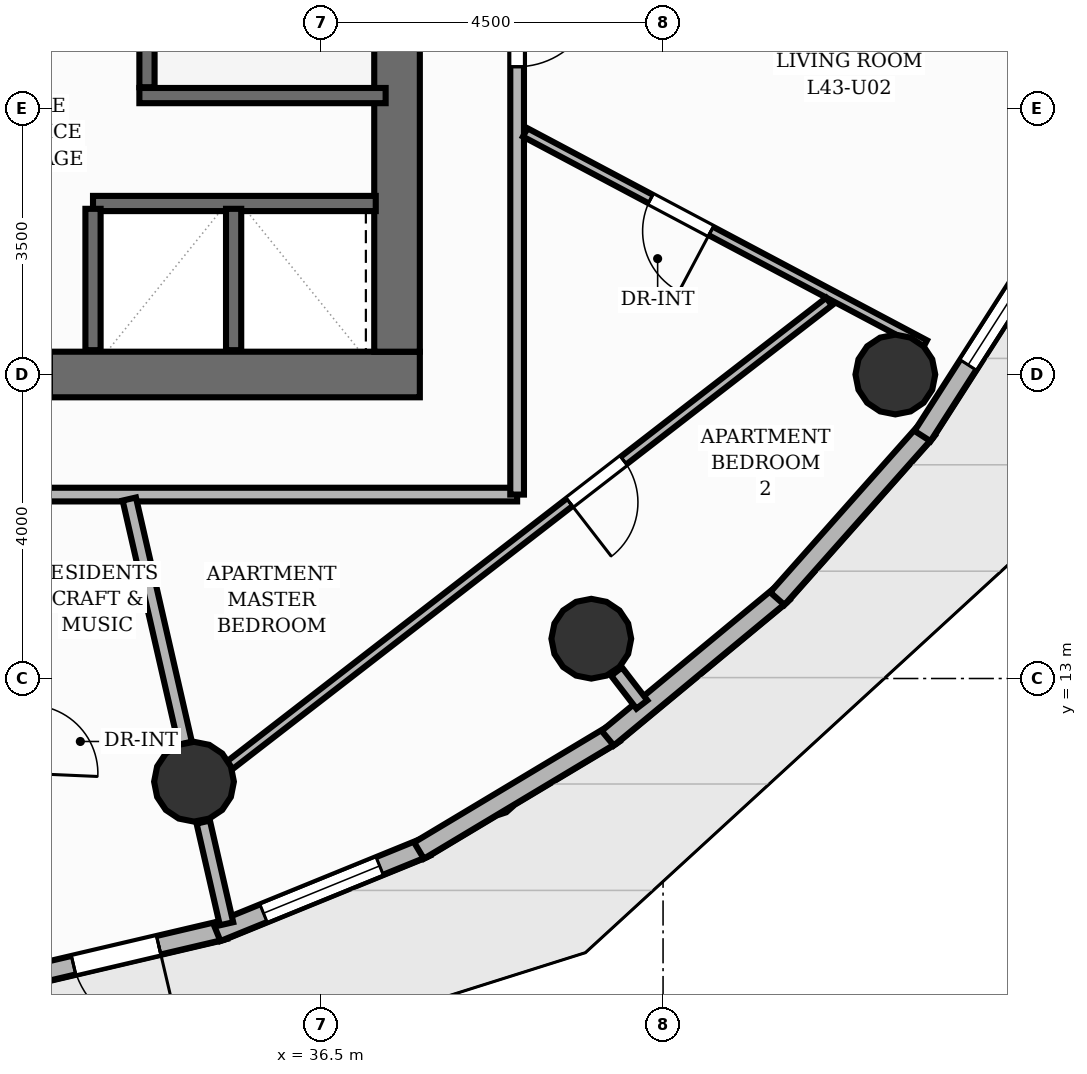
"""IFC4 building model, lengths in metres.
Left out: names, types, materials, properties, quantities, classifications, styles, units other than length and angle.
Written with IfcOpenShell. Run it as: python <this file> out.ifc"""

import sys

from ifc_helpers import new_model, si_unit, direction, frame, frame_2d, origin, origin_2d, place, context, subcontext, project, spatial, rectangle, circle, extrude, element, fill, save


model = new_model("IFC4")
c1 = context("Model", 3, precision=1e-05, world=origin(), true_north=direction((0.0, 1.0)))
c2 = subcontext(c1, "Body", "Model", "MODEL_VIEW")
j1 = project(units=[si_unit("LENGTHUNIT", "METRE"), si_unit("PLANEANGLEUNIT", "RADIAN")], contexts=[c1])
p1 = place(None, origin())
s1 = spatial("IfcSite", under=j1, at=p1, CompositionType="ELEMENT")
p2 = place(p1, origin())
s2 = spatial("IfcBuilding", under=s1, at=p2, CompositionType="ELEMENT")
p3 = place(p2, frame((0.0, 0.0, 145.76)))
s3 = spatial("IfcBuildingStorey", under=s2, at=p3, CompositionType="ELEMENT", Elevation=145.76)
p4 = place(p3, frame((22.7, 17.0, 0.0), z_axis=(0.0, 0.0, 1.0), x_axis=(1.0, 0.0, 0.0)))
e1 = element("IfcWall", 1, at=p4, inside=s3, PredefinedType="SHEAR", context=c2, shape_type="SweptSolid", body=[
    extrude(rectangle(XDim=15.1, YDim=0.6, at=frame_2d((7.55, 0.0))), origin(), (0.0, 0.0, 1.0), 3.2),
])
p5 = place(p4, frame((5.8, 0.0, 0.0)))
e2 = element("IfcOpeningElement", 2, at=p5, cuts=e1, PredefinedType="OPENING", context=c2, shape_type="SweptSolid", body=[
    extrude(rectangle(XDim=1.1, YDim=2.15, at=frame_2d((0.55, 1.075))), frame((0.0, 0.31, 0.0), z_axis=(0.0, -1.0, 0.0), x_axis=(1.0, 0.0, 0.0)), (0.0, 0.0, 1.0), 0.62),
])
p6 = place(p4, frame((9.35, 0.0, 0.0)))
e3 = element("IfcOpeningElement", 3, at=p6, cuts=e1, PredefinedType="OPENING", context=c2, shape_type="SweptSolid", body=[
    extrude(rectangle(XDim=0.9, YDim=2.1, at=frame_2d((0.45, 1.05))), frame((0.0, 0.31, 0.0), z_axis=(0.0, -1.0, 0.0), x_axis=(1.0, 0.0, 0.0)), (0.0, 0.0, 1.0), 0.62),
])
p7 = place(p3, frame((37.5, 17.3, 0.0), z_axis=(0.0, 0.0, 1.0), x_axis=(0.0, 1.0, 0.0)))
e4 = element("IfcWall", 4, at=p7, inside=s3, PredefinedType="SHEAR", context=c2, shape_type="SweptSolid", body=[
    extrude(rectangle(XDim=13.4, YDim=0.6, at=frame_2d((6.7, 0.0))), origin(), (0.0, 0.0, 1.0), 3.2),
])
for number, where, z_axis, x_axis in (
    (5, (34.829, 11.642, 0.0), (0.0, 0.0, 1.0), (1.0, 0.0, 0.0)),
    (6, (40.056, 13.523, 0.0), (0.0, 0.0, 1.0), (1.0, 0.0, 0.0)),
    (7, (44.056, 17.0, 0.0), (0.0, 0.0, 1.0), (1.0, 0.0, 0.0)),
):
    element("IfcColumn", number, at=place(p3, frame(where, z_axis=z_axis, x_axis=x_axis)), inside=s3, PredefinedType="COLUMN", context=c2, shape_type="SweptSolid", body=[
        extrude(circle(Radius=0.525, at=origin_2d()), origin(), (0.0, 0.0, 1.0), 3.2),
    ])
p8 = place(p3, frame((35.233, 9.695, 0.0), z_axis=(0.0, 0.0, 1.0), x_axis=(-0.973538048261, -0.228524984602, 0.0)))
e8 = element("IfcWall", 8, at=p8, inside=s3, PredefinedType="SOLIDWALL", context=c2, shape_type="SweptSolid", body=[
    extrude(rectangle(XDim=2.937, YDim=0.25, at=frame_2d((1.468, 0.0))), origin(), (0.0, 0.0, 1.0), 2.96),
])
p9 = place(p8, frame((0.893, 0.0, 0.0)))
e9 = element("IfcOpeningElement", 9, at=p9, cuts=e8, PredefinedType="OPENING", context=c2, shape_type="SweptSolid", body=[
    extrude(rectangle(XDim=1.15, YDim=2.2, at=frame_2d((0.575, 1.1))), frame((0.0, 0.135, 0.0), z_axis=(0.0, -1.0, 0.0), x_axis=(1.0, 0.0, 0.0)), (0.0, 0.0, 1.0), 0.27),
])
p10 = place(p3, frame((37.886, 10.785, 0.0), z_axis=(0.0, 0.0, 1.0), x_axis=(-0.926076439021, -0.377335963154, 0.0)))
e10 = element("IfcWall", 10, at=p10, inside=s3, PredefinedType="SOLIDWALL", context=c2, shape_type="SweptSolid", body=[
    extrude(rectangle(XDim=2.977, YDim=0.25, at=frame_2d((1.488, 0.0))), origin(), (0.0, 0.0, 1.0), 2.96),
])
p11 = place(p10, frame((0.664, 0.0, 0.85)))
e11 = element("IfcOpeningElement", 11, at=p11, cuts=e10, PredefinedType="OPENING", context=c2, shape_type="SweptSolid", body=[
    extrude(rectangle(XDim=1.65, YDim=1.55, at=frame_2d((0.825, 0.775))), frame((0.0, 0.135, 0.0), z_axis=(0.0, -1.0, 0.0), x_axis=(1.0, 0.0, 0.0)), (0.0, 0.0, 1.0), 0.27),
])
for number, where, z_axis, x_axis in (
    (12, (40.361, 12.277, 0.0), (0.0, 0.0, 1.0), (-0.858, -0.514, 0.0)),
    (13, (42.581, 14.127, 0.0), (0.0, 0.0, 1.0), (-0.77, -0.638, 0.0)),
):
    element("IfcWall", number, at=place(p3, frame(where, z_axis=z_axis, x_axis=x_axis)), inside=s3, PredefinedType="SOLIDWALL", context=c2, shape_type="SweptSolid", body=[
        extrude(rectangle(XDim=2.998, YDim=0.25, at=frame_2d((1.499, 0.0))), origin(), (0.0, 0.0, 1.0), 2.96),
    ])
p12 = place(p3, frame((44.48, 16.277, 0.0), z_axis=(0.0, 0.0, 1.0), x_axis=(-0.664002369324, -0.747730468506, 0.0)))
e14 = element("IfcWall", 14, at=p12, inside=s3, PredefinedType="SOLIDWALL", context=c2, shape_type="SweptSolid", body=[
    extrude(rectangle(XDim=2.977, YDim=0.25, at=frame_2d((1.489, 0.0))), origin(), (0.0, 0.0, 1.0), 2.96),
])
p13 = place(p3, frame((45.998, 18.663, 0.0), z_axis=(0.0, 0.0, 1.0), x_axis=(-0.539492373821, -0.841990486044, 0.0)))
e15 = element("IfcWall", 15, at=p13, inside=s3, PredefinedType="SOLIDWALL", context=c2, shape_type="SweptSolid", body=[
    extrude(rectangle(XDim=2.937, YDim=0.25, at=frame_2d((1.469, 0.0))), origin(), (0.0, 0.0, 1.0), 2.96),
])
p14 = place(p13, frame((0.175, 0.0, 0.85)))
e16 = element("IfcOpeningElement", 16, at=p14, cuts=e15, PredefinedType="OPENING", context=c2, shape_type="SweptSolid", body=[
    extrude(rectangle(XDim=1.65, YDim=1.55, at=frame_2d((0.825, 0.775))), frame((0.0, 0.135, 0.0), z_axis=(0.0, -1.0, 0.0), x_axis=(1.0, 0.0, 0.0)), (0.0, 0.0, 1.0), 0.27),
])
p15 = place(p3, frame((34.21, 20.78, 0.0), z_axis=(0.0, 0.0, 1.0), x_axis=(0.0, 1.0, 0.0)))
e17 = element("IfcWall", 17, at=p15, inside=s3, PredefinedType="SHEAR", context=c2, shape_type="SweptSolid", body=[
    extrude(rectangle(XDim=6.44, YDim=0.2, at=frame_2d((3.22, 0.0))), origin(), (0.0, 0.0, 1.0), 3.2),
])
p16 = place(p3, frame((34.11, 20.67, 0.0), z_axis=(0.0, 0.0, 1.0), x_axis=(1.0, 0.0, 0.0)))
e18 = element("IfcWall", 18, at=p16, inside=s3, PredefinedType="SHEAR", context=c2, shape_type="SweptSolid", body=[
    extrude(rectangle(XDim=3.24, YDim=0.2, at=frame_2d((1.62, 0.0))), origin(), (0.0, 0.0, 1.0), 3.2),
])
p17 = place(p3, frame((33.5, 19.25, 0.0), z_axis=(0.0, 0.0, 1.0), x_axis=(1.0, 0.0, 0.0)))
e19 = element("IfcWall", 19, at=p17, inside=s3, PredefinedType="SHEAR", context=c2, shape_type="SweptSolid", body=[
    extrude(rectangle(XDim=3.72, YDim=0.2, at=frame_2d((1.86, 0.0))), origin(), (0.0, 0.0, 1.0), 3.2),
])
for number, where, z_axis, x_axis in (
    (20, (33.5, 17.32, 0.0), (0.0, 0.0, 1.0), (0.0, 1.0, 0.0)),
    (21, (35.35, 17.32, 0.0), (0.0, 0.0, 1.0), (0.0, 1.0, 0.0)),
):
    element("IfcWall", number, at=place(p3, frame(where, z_axis=z_axis, x_axis=x_axis)), inside=s3, PredefinedType="SHEAR", context=c2, shape_type="SweptSolid", body=[
        extrude(rectangle(XDim=1.86, YDim=0.2, at=frame_2d((0.93, 0.0))), origin(), (0.0, 0.0, 1.0), 3.2),
    ])
p18 = place(p3, frame((34.95, 11.111, 0.0), z_axis=(0.0, 0.0, 1.0), x_axis=(0.223027623572, -0.974812125039, 0.0)))
e22 = element("IfcWall", 22, at=p18, inside=s3, PredefinedType="PARTITIONING", context=c2, shape_type="SweptSolid", body=[
    extrude(rectangle(XDim=1.373, YDim=0.18, at=frame_2d((0.687, 0.0))), origin(), (0.0, 0.0, 1.0), 2.336),
])
p19 = place(p3, frame((40.388, 13.092, 0.0), z_axis=(0.0, 0.0, 1.0), x_axis=(0.6096676216, -0.792657171275, 0.0)))
e23 = element("IfcWall", 23, at=p19, inside=s3, PredefinedType="PARTITIONING", context=c2, shape_type="SweptSolid", body=[
    extrude(rectangle(XDim=0.547, YDim=0.18, at=frame_2d((0.273, 0.0))), origin(), (0.0, 0.0, 1.0), 2.336),
])
p20 = place(p3, frame((39.08, 15.42, 0.0), z_axis=(0.0, 0.0, 1.0), x_axis=(-1.0, 0.0, 0.0)))
e24 = element("IfcWall", 24, at=p20, inside=s3, PredefinedType="PARTITIONING", context=c2, shape_type="SweptSolid", body=[
    extrude(rectangle(XDim=17.66, YDim=0.18, at=frame_2d((8.83, 0.0))), origin(), (0.0, 0.0, 1.0), 2.955),
])
p21 = place(p20, frame((7.368, 0.0, 0.0)))
e25 = element("IfcOpeningElement", 25, at=p21, cuts=e24, PredefinedType="OPENING", context=c2, shape_type="SweptSolid", body=[
    extrude(rectangle(XDim=0.9, YDim=2.1, at=frame_2d((0.45, 1.05))), frame((0.0, 0.1, 0.0), z_axis=(0.0, -1.0, 0.0), x_axis=(1.0, 0.0, 0.0)), (0.0, 0.0, 1.0), 0.2),
])
p22 = place(p20, frame((10.224, 0.0, 0.0)))
e26 = element("IfcOpeningElement", 26, at=p22, cuts=e24, PredefinedType="OPENING", context=c2, shape_type="SweptSolid", body=[
    extrude(rectangle(XDim=0.9, YDim=2.1, at=frame_2d((0.45, 1.05))), frame((0.0, 0.1, 0.0), z_axis=(0.0, -1.0, 0.0), x_axis=(1.0, 0.0, 0.0)), (0.0, 0.0, 1.0), 0.2),
])
p23 = place(p20, frame((14.353, 0.0, 0.0)))
e27 = element("IfcOpeningElement", 27, at=p23, cuts=e24, PredefinedType="OPENING", context=c2, shape_type="SweptSolid", body=[
    extrude(rectangle(XDim=0.9, YDim=2.1, at=frame_2d((0.45, 1.05))), frame((0.0, 0.1, 0.0), z_axis=(0.0, -1.0, 0.0), x_axis=(1.0, 0.0, 0.0)), (0.0, 0.0, 1.0), 0.2),
])
p24 = place(p3, frame((39.08, 28.645, 0.0), z_axis=(0.0, 0.0, 1.0), x_axis=(0.0, -1.0, 0.0)))
e28 = element("IfcWall", 28, at=p24, inside=s3, PredefinedType="PARTITIONING", context=c2, shape_type="SweptSolid", body=[
    extrude(rectangle(XDim=13.225, YDim=0.18, at=frame_2d((6.613, 0.0))), origin(), (0.0, 0.0, 1.0), 2.955),
])
p25 = place(p24, frame((6.545, 0.0, 0.0)))
e29 = element("IfcOpeningElement", 29, at=p25, cuts=e28, PredefinedType="OPENING", context=c2, shape_type="SweptSolid", body=[
    extrude(rectangle(XDim=1.05, YDim=2.15, at=frame_2d((0.525, 1.075))), frame((0.0, 0.1, 0.0), z_axis=(0.0, -1.0, 0.0), x_axis=(1.0, 0.0, 0.0)), (0.0, 0.0, 1.0), 0.2),
])
p26 = place(p24, frame((1.812, 0.0, 0.0)))
e30 = element("IfcOpeningElement", 30, at=p26, cuts=e28, PredefinedType="OPENING", context=c2, shape_type="SweptSolid", body=[
    extrude(rectangle(XDim=0.9, YDim=2.1, at=frame_2d((0.45, 1.05))), frame((0.0, 0.1, 0.0), z_axis=(0.0, -1.0, 0.0), x_axis=(1.0, 0.0, 0.0)), (0.0, 0.0, 1.0), 0.2),
])
p27 = place(p3, frame((33.977, 15.362, 0.0), z_axis=(0.0, 0.0, 1.0), x_axis=(0.22319287001, -0.974774303506, 0.0)))
e31 = element("IfcWall", 31, at=p27, inside=s3, PredefinedType="PARTITIONING", context=c2, shape_type="SweptSolid", body=[
    extrude(rectangle(XDim=3.296, YDim=0.18, at=frame_2d((1.648, 0.0))), origin(), (0.0, 0.0, 1.0), 2.336),
])
p28 = place(p3, frame((44.443, 17.395, 0.0), z_axis=(0.0, 0.0, 1.0), x_axis=(-0.883258541518, 0.468886285612, 0.0)))
e32 = element("IfcWall", 32, at=p28, inside=s3, PredefinedType="PARTITIONING", context=c2, shape_type="SweptSolid", body=[
    extrude(rectangle(XDim=5.952, YDim=0.125, at=frame_2d((2.976, 0.0))), origin(), (0.0, 0.0, 1.0), 2.955),
])
p29 = place(p28, frame((3.184, 0.0, 0.0)))
e33 = element("IfcOpeningElement", 33, at=p29, cuts=e32, PredefinedType="OPENING", context=c2, shape_type="SweptSolid", body=[
    extrude(rectangle(XDim=0.9, YDim=2.1, at=frame_2d((0.45, 1.05))), frame((0.0, 0.073, 0.0), z_axis=(0.0, -1.0, 0.0), x_axis=(1.0, 0.0, 0.0)), (0.0, 0.0, 1.0), 0.145),
])
p30 = place(p3, frame((43.184, 17.96, 0.0), z_axis=(0.0, 0.0, 1.0), x_axis=(-0.790862802872, -0.611993486104, 0.0)))
e34 = element("IfcWall", 34, at=p30, inside=s3, PredefinedType="PARTITIONING", context=c2, shape_type="SweptSolid", body=[
    extrude(rectangle(XDim=9.975, YDim=0.125, at=frame_2d((4.987, 0.0))), origin(), (0.0, 0.0, 1.0), 2.411),
])
p31 = place(p30, frame((3.417, 0.0, 0.0)))
e35 = element("IfcOpeningElement", 35, at=p31, cuts=e34, PredefinedType="OPENING", context=c2, shape_type="SweptSolid", body=[
    extrude(rectangle(XDim=0.9, YDim=2.1, at=frame_2d((0.45, 1.05))), frame((0.0, 0.073, 0.0), z_axis=(0.0, -1.0, 0.0), x_axis=(1.0, 0.0, 0.0)), (0.0, 0.0, 1.0), 0.145),
])
p32 = place(p9, origin())
e36 = element("IfcDoor", 36, at=p32, inside=s3, OperationType="SINGLE_SWING_LEFT", PredefinedType="DOOR", context=c2, shape_type="SweptSolid", body=[
    extrude(rectangle(XDim=1.15, YDim=2.2, at=frame_2d((0.575, 1.1))), frame((0.0, 0.025, 0.0), z_axis=(0.0, -1.0, 0.0), x_axis=(1.0, 0.0, 0.0)), (0.0, 0.0, 1.0), 0.05),
])
fill(e9, e36)
p33 = place(p11, origin())
e37 = element("IfcWindow", 37, at=p33, inside=s3, PartitioningType="SINGLE_PANEL", PredefinedType="WINDOW", context=c2, shape_type="SweptSolid", body=[
    extrude(rectangle(XDim=1.65, YDim=1.55, at=frame_2d((0.825, 0.775))), frame((0.0, 0.03, 0.0), z_axis=(0.0, -1.0, 0.0), x_axis=(1.0, 0.0, 0.0)), (0.0, 0.0, 1.0), 0.06),
])
fill(e11, e37)
p34 = place(p14, origin())
e38 = element("IfcWindow", 38, at=p34, inside=s3, PartitioningType="SINGLE_PANEL", PredefinedType="WINDOW", context=c2, shape_type="SweptSolid", body=[
    extrude(rectangle(XDim=1.65, YDim=1.55, at=frame_2d((0.825, 0.775))), frame((0.0, 0.03, 0.0), z_axis=(0.0, -1.0, 0.0), x_axis=(1.0, 0.0, 0.0)), (0.0, 0.0, 1.0), 0.06),
])
fill(e16, e38)
p35 = place(p25, origin())
e39 = element("IfcDoor", 39, at=p35, inside=s3, OperationType="SINGLE_SWING_LEFT", PredefinedType="DOOR", context=c2, shape_type="SweptSolid", body=[
    extrude(rectangle(XDim=1.05, YDim=2.15, at=frame_2d((0.525, 1.075))), frame((0.0, 0.025, 0.0), z_axis=(0.0, -1.0, 0.0), x_axis=(1.0, 0.0, 0.0)), (0.0, 0.0, 1.0), 0.05),
])
fill(e29, e39)
p36 = place(p29, origin())
e40 = element("IfcDoor", 40, at=p36, inside=s3, OperationType="SINGLE_SWING_LEFT", PredefinedType="DOOR", context=c2, shape_type="SweptSolid", body=[
    extrude(rectangle(XDim=0.9, YDim=2.1, at=frame_2d((0.45, 1.05))), frame((0.0, 0.025, 0.0), z_axis=(0.0, -1.0, 0.0), x_axis=(1.0, 0.0, 0.0)), (0.0, 0.0, 1.0), 0.05),
])
fill(e33, e40)
p37 = place(p31, origin())
e41 = element("IfcDoor", 41, at=p37, inside=s3, OperationType="SINGLE_SWING_RIGHT", PredefinedType="DOOR", context=c2, shape_type="SweptSolid", body=[
    extrude(rectangle(XDim=0.9, YDim=2.1, at=frame_2d((0.45, 1.05))), frame((0.0, 0.025, 0.0), z_axis=(0.0, -1.0, 0.0), x_axis=(1.0, 0.0, 0.0)), (0.0, 0.0, 1.0), 0.05),
])
fill(e35, e41)
save(model, sys.argv[1])
